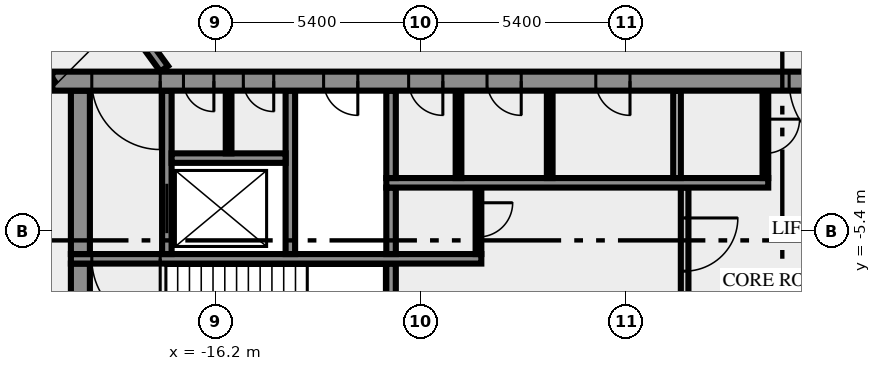
"""IFC4 building model, lengths in metres.
Left out: names, types, materials, properties, quantities, classifications, styles, units other than length and angle.
Written with IfcOpenShell. Run it as: python <this file> out.ifc"""

import sys

from ifc_helpers import new_model, si_unit, direction, frame, frame_2d, origin, place, context, subcontext, project, spatial, rectangle, extrude, element, fill, save


model = new_model("IFC4")
c1 = context("Model", 3, precision=1e-05, world=origin(), true_north=direction((0.0, 1.0)))
c2 = subcontext(c1, "Body", "Model", "MODEL_VIEW")
j1 = project(units=[si_unit("LENGTHUNIT", "METRE"), si_unit("PLANEANGLEUNIT", "RADIAN")], contexts=[c1])
p1 = place(None, origin())
s1 = spatial("IfcSite", under=j1, at=p1, CompositionType="ELEMENT")
p2 = place(p1, origin())
s2 = spatial("IfcBuilding", under=s1, at=p2, CompositionType="ELEMENT")
p3 = place(p2, frame((0.0, 0.0, 210.0)))
s3 = spatial("IfcBuildingStorey", under=s2, at=p3, CompositionType="ELEMENT", Elevation=210.0)
p4 = place(p3, frame((-19.75, -10.5, 0.0), z_axis=(0.0, 0.0, 1.0), x_axis=(0.0, 1.0, 0.0)))
e1 = element("IfcWall", 1, at=p4, inside=s3, PredefinedType="SHEAR", context=c2, shape_type="SweptSolid", body=[
    extrude(rectangle(XDim=4.25, YDim=0.5, at=frame_2d((2.125, 0.0))), origin(), (0.0, 0.0, 1.0), 3.65),
])
p5 = place(p3, frame((-11.575, -7.25, 0.0), z_axis=(0.0, 0.0, 1.0), x_axis=(0.0, 1.0, 0.0)))
e2 = element("IfcWall", 2, at=p5, inside=s3, PredefinedType="SHEAR", context=c2, shape_type="SweptSolid", body=[
    extrude(rectangle(XDim=1.0, YDim=0.25, at=frame_2d((0.5, 0.0))), origin(), (0.0, 0.0, 1.0), 3.65),
])
p6 = place(p3, frame((-3.85, -4.25, 0.0), z_axis=(0.0, 0.0, 1.0), x_axis=(0.0, -1.0, 0.0)))
e3 = element("IfcWall", 3, at=p6, inside=s3, PredefinedType="SOLIDWALL", context=c2, shape_type="SweptSolid", body=[
    extrude(rectangle(XDim=3.0, YDim=0.2, at=frame_2d((1.5, 0.0))), origin(), (0.0, 0.0, 1.0), 3.65),
])
p7 = place(p6, frame((0.8, 0.0, 0.0)))
e4 = element("IfcOpeningElement", 4, at=p7, cuts=e3, PredefinedType="OPENING", context=c2, shape_type="SweptSolid", body=[
    extrude(rectangle(XDim=1.4, YDim=2.1, at=frame_2d((0.7, 1.05))), frame((0.0, 0.11, 0.0), z_axis=(0.0, -1.0, 0.0), x_axis=(1.0, 0.0, 0.0)), (0.0, 0.0, 1.0), 0.22),
])
p8 = place(p3, frame((-9.2, -6.125, 0.0), z_axis=(0.0, 0.0, 1.0), x_axis=(-1.0, 0.0, 0.0)))
e5 = element("IfcWall", 5, at=p8, inside=s3, PredefinedType="SHEAR", context=c2, shape_type="SweptSolid", body=[
    extrude(rectangle(XDim=10.8, YDim=0.25, at=frame_2d((5.4, 0.0))), origin(), (0.0, 0.0, 1.0), 3.65),
])
p9 = place(p8, frame((8.45, 0.0, 0.0)))
e6 = element("IfcOpeningElement", 6, at=p9, cuts=e5, PredefinedType="OPENING", context=c2, shape_type="SweptSolid", body=[
    extrude(rectangle(XDim=1.8, YDim=2.1, at=frame_2d((0.9, 1.05))), frame((0.0, 0.135, 0.0), z_axis=(0.0, -1.0, 0.0), x_axis=(1.0, 0.0, 0.0)), (0.0, 0.0, 1.0), 0.27),
])
p10 = place(p3, frame((-19.75, -6.0, 0.0), z_axis=(0.0, 0.0, 1.0), x_axis=(0.0, 1.0, 0.0)))
e7 = element("IfcWall", 7, at=p10, inside=s3, PredefinedType="SHEAR", context=c2, shape_type="SweptSolid", body=[
    extrude(rectangle(XDim=4.3, YDim=0.5, at=frame_2d((2.15, 0.0))), origin(), (0.0, 0.0, 1.0), 3.65),
])
p11 = place(p3, frame((-17.475, -6.0, 0.0), z_axis=(0.0, 0.0, 1.0), x_axis=(0.0, 1.0, 0.0)))
e8 = element("IfcWall", 8, at=p11, inside=s3, PredefinedType="SHEAR", context=c2, shape_type="SweptSolid", body=[
    extrude(rectangle(XDim=4.3, YDim=0.25, at=frame_2d((2.15, 0.0))), origin(), (0.0, 0.0, 1.0), 3.65),
])
p12 = place(p11, frame((0.55, 0.0, 0.0)))
e9 = element("IfcOpeningElement", 9, at=p12, cuts=e8, PredefinedType="OPENING", context=c2, shape_type="SweptSolid", body=[
    extrude(rectangle(XDim=1.3, YDim=2.1, at=frame_2d((0.65, 1.05))), frame((0.0, 0.135, 0.0), z_axis=(0.0, -1.0, 0.0), x_axis=(1.0, 0.0, 0.0)), (0.0, 0.0, 1.0), 0.27),
])
p13 = place(p3, frame((-14.225, -6.0, 0.0), z_axis=(0.0, 0.0, 1.0), x_axis=(0.0, 1.0, 0.0)))
e10 = element("IfcWall", 10, at=p13, inside=s3, PredefinedType="SHEAR", context=c2, shape_type="SweptSolid", body=[
    extrude(rectangle(XDim=4.3, YDim=0.25, at=frame_2d((2.15, 0.0))), origin(), (0.0, 0.0, 1.0), 3.65),
])
p14 = place(p3, frame((-11.575, -6.0, 0.0), z_axis=(0.0, 0.0, 1.0), x_axis=(0.0, 1.0, 0.0)))
e11 = element("IfcWall", 11, at=p14, inside=s3, PredefinedType="SHEAR", context=c2, shape_type="SweptSolid", body=[
    extrude(rectangle(XDim=1.75, YDim=0.25, at=frame_2d((0.875, 0.0))), origin(), (0.0, 0.0, 1.0), 3.65),
])
p15 = place(p3, frame((-9.275, -4.25, 0.0), z_axis=(0.0, 0.0, 1.0), x_axis=(0.0, -1.0, 0.0)))
e12 = element("IfcWall", 12, at=p15, inside=s3, PredefinedType="PARTITIONING", context=c2, shape_type="SweptSolid", body=[
    extrude(rectangle(XDim=1.75, YDim=0.15, at=frame_2d((0.875, 0.0))), origin(), (0.0, 0.0, 1.0), 3.65),
])
p16 = place(p15, frame((0.4, 0.0, 0.0)))
e13 = element("IfcOpeningElement", 13, at=p16, cuts=e12, PredefinedType="OPENING", context=c2, shape_type="SweptSolid", body=[
    extrude(rectangle(XDim=0.9, YDim=2.1, at=frame_2d((0.45, 1.05))), frame((0.0, 0.085, 0.0), z_axis=(0.0, -1.0, 0.0), x_axis=(1.0, 0.0, 0.0)), (0.0, 0.0, 1.0), 0.17),
])
p17 = place(p3, frame((-11.7, -4.125, 0.0), z_axis=(0.0, 0.0, 1.0), x_axis=(1.0, 0.0, 0.0)))
e14 = element("IfcWall", 14, at=p17, inside=s3, PredefinedType="SHEAR", context=c2, shape_type="SweptSolid", body=[
    extrude(rectangle(XDim=10.05, YDim=0.25, at=frame_2d((5.025, 0.0))), origin(), (0.0, 0.0, 1.0), 3.65),
])
p18 = place(p3, frame((-11.575, -4.0, 0.0), z_axis=(0.0, 0.0, 1.0), x_axis=(0.0, 1.0, 0.0)))
e15 = element("IfcWall", 15, at=p18, inside=s3, PredefinedType="SHEAR", context=c2, shape_type="SweptSolid", body=[
    extrude(rectangle(XDim=2.3, YDim=0.25, at=frame_2d((1.15, 0.0))), origin(), (0.0, 0.0, 1.0), 3.65),
])
for number, where, z_axis, x_axis in (
    (16, (-9.8, -4.0, 0.0), (0.0, 0.0, 1.0), (0.0, 1.0, 0.0)),
    (17, (-7.4, -4.0, 0.0), (0.0, 0.0, 1.0), (0.0, 1.0, 0.0)),
):
    element("IfcWall", number, at=place(p3, frame(where, z_axis=z_axis, x_axis=x_axis)), inside=s3, PredefinedType="PARTITIONING", context=c2, shape_type="SweptSolid", body=[
        extrude(rectangle(XDim=2.3, YDim=0.15, at=frame_2d((1.15, 0.0))), origin(), (0.0, 0.0, 1.0), 3.65),
    ])
p19 = place(p3, frame((-4.05, -4.0, 0.0), z_axis=(0.0, 0.0, 1.0), x_axis=(0.0, 1.0, 0.0)))
e18 = element("IfcWall", 18, at=p19, inside=s3, PredefinedType="SOLIDWALL", context=c2, shape_type="SweptSolid", body=[
    extrude(rectangle(XDim=2.3, YDim=0.2, at=frame_2d((1.15, 0.0))), origin(), (0.0, 0.0, 1.0), 3.65),
])
p20 = place(p3, frame((-1.725, -1.7, 0.0), z_axis=(0.0, 0.0, 1.0), x_axis=(0.0, -1.0, 0.0)))
e19 = element("IfcWall", 19, at=p20, inside=s3, PredefinedType="PARTITIONING", context=c2, shape_type="SweptSolid", body=[
    extrude(rectangle(XDim=2.3, YDim=0.15, at=frame_2d((1.15, 0.0))), origin(), (0.0, 0.0, 1.0), 3.65),
])
p21 = place(p20, frame((0.75, 0.0, 0.0)))
e20 = element("IfcOpeningElement", 20, at=p21, cuts=e19, PredefinedType="OPENING", context=c2, shape_type="SweptSolid", body=[
    extrude(rectangle(XDim=0.9, YDim=2.1, at=frame_2d((0.45, 1.05))), frame((0.0, 0.085, 0.0), z_axis=(0.0, -1.0, 0.0), x_axis=(1.0, 0.0, 0.0)), (0.0, 0.0, 1.0), 0.17),
])
p22 = place(p3, frame((-17.35, -3.475, 0.0), z_axis=(0.0, 0.0, 1.0), x_axis=(1.0, 0.0, 0.0)))
e21 = element("IfcWall", 21, at=p22, inside=s3, PredefinedType="SHEAR", context=c2, shape_type="SweptSolid", body=[
    extrude(rectangle(XDim=3.0, YDim=0.25, at=frame_2d((1.5, 0.0))), origin(), (0.0, 0.0, 1.0), 3.65),
])
p23 = place(p3, frame((-15.85, -3.35, 0.0), z_axis=(0.0, 0.0, 1.0), x_axis=(0.0, 1.0, 0.0)))
e22 = element("IfcWall", 22, at=p23, inside=s3, PredefinedType="PARTITIONING", context=c2, shape_type="SweptSolid", body=[
    extrude(rectangle(XDim=1.65, YDim=0.15, at=frame_2d((0.825, 0.0))), origin(), (0.0, 0.0, 1.0), 3.65),
])
p24 = place(p3, frame((20.49, -1.45, 0.0), z_axis=(0.0, 0.0, 1.0), x_axis=(-1.0, 0.0, 0.0)))
e23 = element("IfcWall", 23, at=p24, inside=s3, PredefinedType="SHEAR", context=c2, shape_type="SweptSolid", body=[
    extrude(rectangle(XDim=40.98, YDim=0.5, at=frame_2d((20.49, 0.0))), origin(), (0.0, 0.0, 1.0), 3.65),
])
p25 = place(p24, frame((38.14, 0.0, 0.0)))
e24 = element("IfcOpeningElement", 24, at=p25, cuts=e23, PredefinedType="OPENING", context=c2, shape_type="SweptSolid", body=[
    extrude(rectangle(XDim=1.8, YDim=2.1, at=frame_2d((0.9, 1.05))), frame((0.0, 0.26, 0.0), z_axis=(0.0, -1.0, 0.0), x_axis=(1.0, 0.0, 0.0)), (0.0, 0.0, 1.0), 0.52),
])
p26 = place(p24, frame((36.728, 0.0, 0.0)))
e25 = element("IfcOpeningElement", 25, at=p26, cuts=e23, PredefinedType="OPENING", context=c2, shape_type="SweptSolid", body=[
    extrude(rectangle(XDim=0.8, YDim=2.1, at=frame_2d((0.4, 1.05))), frame((0.0, 0.26, 0.0), z_axis=(0.0, -1.0, 0.0), x_axis=(1.0, 0.0, 0.0)), (0.0, 0.0, 1.0), 0.52),
])
p27 = place(p24, frame((35.153, 0.0, 0.0)))
e26 = element("IfcOpeningElement", 26, at=p27, cuts=e23, PredefinedType="OPENING", context=c2, shape_type="SweptSolid", body=[
    extrude(rectangle(XDim=0.8, YDim=2.1, at=frame_2d((0.4, 1.05))), frame((0.0, 0.26, 0.0), z_axis=(0.0, -1.0, 0.0), x_axis=(1.0, 0.0, 0.0)), (0.0, 0.0, 1.0), 0.52),
])
p28 = place(p24, frame((32.94, 0.0, 0.0)))
e27 = element("IfcOpeningElement", 27, at=p28, cuts=e23, PredefinedType="OPENING", context=c2, shape_type="SweptSolid", body=[
    extrude(rectangle(XDim=0.9, YDim=2.1, at=frame_2d((0.45, 1.05))), frame((0.0, 0.26, 0.0), z_axis=(0.0, -1.0, 0.0), x_axis=(1.0, 0.0, 0.0)), (0.0, 0.0, 1.0), 0.52),
])
p29 = place(p24, frame((30.702, 0.0, 0.0)))
e28 = element("IfcOpeningElement", 28, at=p29, cuts=e23, PredefinedType="OPENING", context=c2, shape_type="SweptSolid", body=[
    extrude(rectangle(XDim=0.9, YDim=2.1, at=frame_2d((0.45, 1.05))), frame((0.0, 0.26, 0.0), z_axis=(0.0, -1.0, 0.0), x_axis=(1.0, 0.0, 0.0)), (0.0, 0.0, 1.0), 0.52),
])
p30 = place(p24, frame((28.64, 0.0, 0.0)))
e29 = element("IfcOpeningElement", 29, at=p30, cuts=e23, PredefinedType="OPENING", context=c2, shape_type="SweptSolid", body=[
    extrude(rectangle(XDim=0.9, YDim=2.1, at=frame_2d((0.45, 1.05))), frame((0.0, 0.26, 0.0), z_axis=(0.0, -1.0, 0.0), x_axis=(1.0, 0.0, 0.0)), (0.0, 0.0, 1.0), 0.52),
])
p31 = place(p24, frame((25.778, 0.0, 0.0)))
e30 = element("IfcOpeningElement", 30, at=p31, cuts=e23, PredefinedType="OPENING", context=c2, shape_type="SweptSolid", body=[
    extrude(rectangle(XDim=0.9, YDim=2.1, at=frame_2d((0.45, 1.05))), frame((0.0, 0.26, 0.0), z_axis=(0.0, -1.0, 0.0), x_axis=(1.0, 0.0, 0.0)), (0.0, 0.0, 1.0), 0.52),
])
p32 = place(p24, frame((19.59, 0.0, 0.0)))
e31 = element("IfcOpeningElement", 31, at=p32, cuts=e23, PredefinedType="OPENING", context=c2, shape_type="SweptSolid", body=[
    extrude(rectangle(XDim=2.0, YDim=2.1, at=frame_2d((1.0, 1.05))), frame((0.0, 0.26, 0.0), z_axis=(0.0, -1.0, 0.0), x_axis=(1.0, 0.0, 0.0)), (0.0, 0.0, 1.0), 0.52),
])
p33 = place(p24, frame((7.14, 0.0, 0.0)))
e32 = element("IfcOpeningElement", 32, at=p33, cuts=e23, PredefinedType="OPENING", context=c2, shape_type="SweptSolid", body=[
    extrude(rectangle(XDim=0.9, YDim=2.1, at=frame_2d((0.45, 1.05))), frame((0.0, 0.26, 0.0), z_axis=(0.0, -1.0, 0.0), x_axis=(1.0, 0.0, 0.0)), (0.0, 0.0, 1.0), 0.52),
])
p34 = place(p24, frame((4.19, 0.0, 0.0)))
e33 = element("IfcOpeningElement", 33, at=p34, cuts=e23, PredefinedType="OPENING", context=c2, shape_type="SweptSolid", body=[
    extrude(rectangle(XDim=0.9, YDim=2.1, at=frame_2d((0.45, 1.05))), frame((0.0, 0.26, 0.0), z_axis=(0.0, -1.0, 0.0), x_axis=(1.0, 0.0, 0.0)), (0.0, 0.0, 1.0), 0.52),
])
p35 = place(p24, frame((1.04, 0.0, 0.0)))
e34 = element("IfcOpeningElement", 34, at=p35, cuts=e23, PredefinedType="OPENING", context=c2, shape_type="SweptSolid", body=[
    extrude(rectangle(XDim=1.8, YDim=2.1, at=frame_2d((0.9, 1.05))), frame((0.0, 0.26, 0.0), z_axis=(0.0, -1.0, 0.0), x_axis=(1.0, 0.0, 0.0)), (0.0, 0.0, 1.0), 0.52),
])
p36 = place(p3, frame((-20.531, -1.523, 0.0), z_axis=(0.0, 0.0, 1.0), x_axis=(-0.587784239999, 0.809017729849, 0.0)))
e35 = element("IfcWall", 35, at=p36, inside=s3, PredefinedType="SOLIDWALL", context=c2, shape_type="SweptSolid", body=[
    extrude(rectangle(XDim=23.271, YDim=0.25, at=frame_2d((11.635, 0.0))), origin(), (0.0, 0.0, 1.0), 3.65),
])
p37 = place(p36, frame((16.716, 0.0, 0.0)))
e36 = element("IfcOpeningElement", 36, at=p37, cuts=e35, PredefinedType="OPENING", context=c2, shape_type="SweptSolid", body=[
    extrude(rectangle(XDim=1.2, YDim=2.1, at=frame_2d((0.6, 1.05))), frame((0.0, 0.135, 0.0), z_axis=(0.0, -1.0, 0.0), x_axis=(1.0, 0.0, 0.0)), (0.0, 0.0, 1.0), 0.27),
])
p38 = place(p36, frame((18.616, 0.0, 0.0)))
e37 = element("IfcOpeningElement", 37, at=p38, cuts=e35, PredefinedType="OPENING", context=c2, shape_type="SweptSolid", body=[
    extrude(rectangle(XDim=0.9, YDim=2.1, at=frame_2d((0.45, 1.05))), frame((0.0, 0.135, 0.0), z_axis=(0.0, -1.0, 0.0), x_axis=(1.0, 0.0, 0.0)), (0.0, 0.0, 1.0), 0.27),
])
p39 = place(p3, frame((-31.918, 18.658, 0.0), z_axis=(0.0, 0.0, 1.0), x_axis=(0.587788731405, -0.80901446664, 0.0)))
e38 = element("IfcWall", 38, at=p39, inside=s3, PredefinedType="SOLIDWALL", context=c2, shape_type="SweptSolid", body=[
    extrude(rectangle(XDim=24.453, YDim=0.25, at=frame_2d((12.227, 0.0))), origin(), (0.0, 0.0, 1.0), 3.65),
])
p40 = place(p39, frame((20.112, 0.0, 0.0)))
e39 = element("IfcOpeningElement", 39, at=p40, cuts=e38, PredefinedType="OPENING", context=c2, shape_type="SweptSolid", body=[
    extrude(rectangle(XDim=0.9, YDim=2.1, at=frame_2d((0.45, 1.05))), frame((0.0, 0.135, 0.0), z_axis=(0.0, -1.0, 0.0), x_axis=(1.0, 0.0, 0.0)), (0.0, 0.0, 1.0), 0.27),
])
p41 = place(p39, frame((4.445, 0.0, 0.0)))
e40 = element("IfcOpeningElement", 40, at=p41, cuts=e38, PredefinedType="OPENING", context=c2, shape_type="SweptSolid", body=[
    extrude(rectangle(XDim=0.9, YDim=2.1, at=frame_2d((0.45, 1.05))), frame((0.0, 0.135, 0.0), z_axis=(0.0, -1.0, 0.0), x_axis=(1.0, 0.0, 0.0)), (0.0, 0.0, 1.0), 0.27),
])
p42 = place(p7, origin())
e41 = element("IfcDoor", 41, at=p42, inside=s3, OperationType="DOUBLE_DOOR_SINGLE_SWING", PredefinedType="DOOR", context=c2, shape_type="SweptSolid", body=[
    extrude(rectangle(XDim=1.4, YDim=2.1, at=frame_2d((0.7, 1.05))), frame((0.0, 0.025, 0.0), z_axis=(0.0, -1.0, 0.0), x_axis=(1.0, 0.0, 0.0)), (0.0, 0.0, 1.0), 0.05),
])
fill(e4, e41)
p43 = place(p9, origin())
e42 = element("IfcDoor", 42, at=p43, inside=s3, OperationType="DOUBLE_DOOR_SINGLE_SWING", PredefinedType="DOOR", context=c2, shape_type="SweptSolid", body=[
    extrude(rectangle(XDim=1.8, YDim=2.1, at=frame_2d((0.9, 1.05))), frame((0.0, 0.025, 0.0), z_axis=(0.0, -1.0, 0.0), x_axis=(1.0, 0.0, 0.0)), (0.0, 0.0, 1.0), 0.05),
])
fill(e6, e42)
p44 = place(p12, origin())
e43 = element("IfcDoor", 43, at=p44, inside=s3, OperationType="DOUBLE_DOOR_SLIDING", PredefinedType="DOOR", context=c2, shape_type="SweptSolid", body=[
    extrude(rectangle(XDim=1.3, YDim=2.1, at=frame_2d((0.65, 1.05))), frame((0.0, 0.025, 0.0), z_axis=(0.0, -1.0, 0.0), x_axis=(1.0, 0.0, 0.0)), (0.0, 0.0, 1.0), 0.05),
])
fill(e9, e43)
p45 = place(p16, origin())
e44 = element("IfcDoor", 44, at=p45, inside=s3, OperationType="SINGLE_SWING_LEFT", PredefinedType="DOOR", context=c2, shape_type="SweptSolid", body=[
    extrude(rectangle(XDim=0.9, YDim=2.1, at=frame_2d((0.45, 1.05))), frame((0.0, 0.025, 0.0), z_axis=(0.0, -1.0, 0.0), x_axis=(1.0, 0.0, 0.0)), (0.0, 0.0, 1.0), 0.05),
])
fill(e13, e44)
p46 = place(p21, origin())
e45 = element("IfcDoor", 45, at=p46, inside=s3, OperationType="SINGLE_SWING_RIGHT", PredefinedType="DOOR", context=c2, shape_type="SweptSolid", body=[
    extrude(rectangle(XDim=0.9, YDim=2.1, at=frame_2d((0.45, 1.05))), frame((0.0, 0.025, 0.0), z_axis=(0.0, -1.0, 0.0), x_axis=(1.0, 0.0, 0.0)), (0.0, 0.0, 1.0), 0.05),
])
fill(e20, e45)
p47 = place(p25, origin())
e46 = element("IfcDoor", 46, at=p47, inside=s3, OperationType="DOUBLE_DOOR_SINGLE_SWING", PredefinedType="DOOR", context=c2, shape_type="SweptSolid", body=[
    extrude(rectangle(XDim=1.8, YDim=2.1, at=frame_2d((0.9, 1.05))), frame((0.0, 0.025, 0.0), z_axis=(0.0, -1.0, 0.0), x_axis=(1.0, 0.0, 0.0)), (0.0, 0.0, 1.0), 0.05),
])
fill(e24, e46)
p48 = place(p26, origin())
e47 = element("IfcDoor", 47, at=p48, inside=s3, OperationType="SINGLE_SWING_RIGHT", PredefinedType="DOOR", context=c2, shape_type="SweptSolid", body=[
    extrude(rectangle(XDim=0.8, YDim=2.1, at=frame_2d((0.4, 1.05))), frame((0.0, 0.025, 0.0), z_axis=(0.0, -1.0, 0.0), x_axis=(1.0, 0.0, 0.0)), (0.0, 0.0, 1.0), 0.05),
])
fill(e25, e47)
p49 = place(p27, origin())
e48 = element("IfcDoor", 48, at=p49, inside=s3, OperationType="SINGLE_SWING_RIGHT", PredefinedType="DOOR", context=c2, shape_type="SweptSolid", body=[
    extrude(rectangle(XDim=0.8, YDim=2.1, at=frame_2d((0.4, 1.05))), frame((0.0, 0.025, 0.0), z_axis=(0.0, -1.0, 0.0), x_axis=(1.0, 0.0, 0.0)), (0.0, 0.0, 1.0), 0.05),
])
fill(e26, e48)
p50 = place(p28, origin())
e49 = element("IfcDoor", 49, at=p50, inside=s3, OperationType="SINGLE_SWING_RIGHT", PredefinedType="DOOR", context=c2, shape_type="SweptSolid", body=[
    extrude(rectangle(XDim=0.9, YDim=2.1, at=frame_2d((0.45, 1.05))), frame((0.0, 0.025, 0.0), z_axis=(0.0, -1.0, 0.0), x_axis=(1.0, 0.0, 0.0)), (0.0, 0.0, 1.0), 0.05),
])
fill(e27, e49)
p51 = place(p29, origin())
e50 = element("IfcDoor", 50, at=p51, inside=s3, OperationType="SINGLE_SWING_RIGHT", PredefinedType="DOOR", context=c2, shape_type="SweptSolid", body=[
    extrude(rectangle(XDim=0.9, YDim=2.1, at=frame_2d((0.45, 1.05))), frame((0.0, 0.025, 0.0), z_axis=(0.0, -1.0, 0.0), x_axis=(1.0, 0.0, 0.0)), (0.0, 0.0, 1.0), 0.05),
])
fill(e28, e50)
p52 = place(p30, origin())
e51 = element("IfcDoor", 51, at=p52, inside=s3, OperationType="SINGLE_SWING_RIGHT", PredefinedType="DOOR", context=c2, shape_type="SweptSolid", body=[
    extrude(rectangle(XDim=0.9, YDim=2.1, at=frame_2d((0.45, 1.05))), frame((0.0, 0.025, 0.0), z_axis=(0.0, -1.0, 0.0), x_axis=(1.0, 0.0, 0.0)), (0.0, 0.0, 1.0), 0.05),
])
fill(e29, e51)
p53 = place(p31, origin())
e52 = element("IfcDoor", 52, at=p53, inside=s3, OperationType="SINGLE_SWING_RIGHT", PredefinedType="DOOR", context=c2, shape_type="SweptSolid", body=[
    extrude(rectangle(XDim=0.9, YDim=2.1, at=frame_2d((0.45, 1.05))), frame((0.0, 0.025, 0.0), z_axis=(0.0, -1.0, 0.0), x_axis=(1.0, 0.0, 0.0)), (0.0, 0.0, 1.0), 0.05),
])
fill(e30, e52)
p54 = place(p32, origin())
e53 = element("IfcDoor", 53, at=p54, inside=s3, OperationType="DOUBLE_DOOR_SINGLE_SWING", PredefinedType="DOOR", context=c2, shape_type="SweptSolid", body=[
    extrude(rectangle(XDim=2.0, YDim=2.1, at=frame_2d((1.0, 1.05))), frame((0.0, 0.025, 0.0), z_axis=(0.0, -1.0, 0.0), x_axis=(1.0, 0.0, 0.0)), (0.0, 0.0, 1.0), 0.05),
])
fill(e31, e53)
save(model, sys.argv[1])
